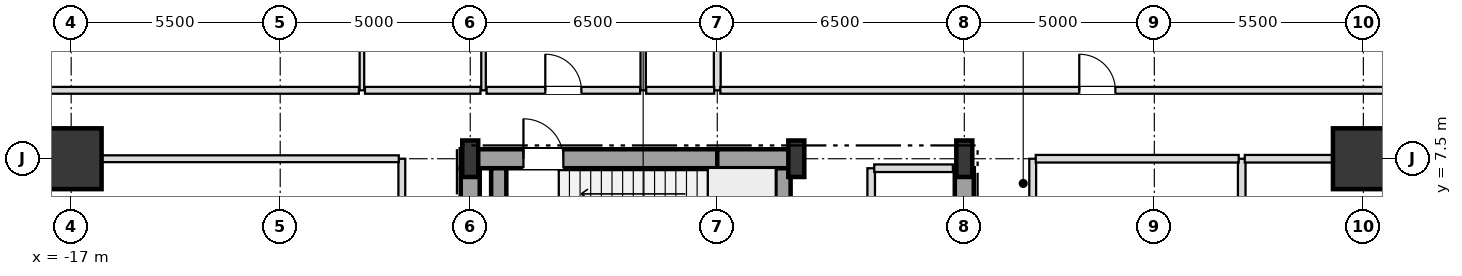
"""IFC4 building model, lengths in metres.
Left out: names, types, materials, properties, quantities, classifications, styles, units other than length and angle.
Written with IfcOpenShell. Run it as: python <this file> out.ifc"""

import sys

from ifc_helpers import new_model, si_unit, direction, frame, frame_2d, origin, origin_2d, place, context, subcontext, project, spatial, rectangle, i_section, extrude, element, fill, save


model = new_model("IFC4")
c1 = context("Model", 3, precision=1e-05, world=origin(), true_north=direction((0.0, 1.0)))
c2 = subcontext(c1, "Body", "Model", "MODEL_VIEW")
j1 = project(units=[si_unit("LENGTHUNIT", "METRE"), si_unit("PLANEANGLEUNIT", "RADIAN")], contexts=[c1])
p1 = place(None, origin())
s1 = spatial("IfcSite", under=j1, at=p1, CompositionType="ELEMENT")
p2 = place(p1, origin())
s2 = spatial("IfcBuilding", under=s1, at=p2, CompositionType="ELEMENT")
p3 = place(p2, frame((0.0, 0.0, 16.8)))
s3 = spatial("IfcBuildingStorey", under=s2, at=p3, CompositionType="ELEMENT", Elevation=16.8)
for number, where, z_axis, x_axis in (
    (1, (-6.5, 7.5, 0.0), (0.0, 0.0, 1.0), (1.0, 0.0, 0.0)),
    (2, (2.08, 7.5, 0.0), (0.0, 0.0, 1.0), (1.0, 0.0, 0.0)),
    (3, (6.5, 7.5, 0.0), (0.0, 0.0, 1.0), (1.0, 0.0, 0.0)),
):
    element("IfcColumn", number, at=place(p3, frame(where, z_axis=z_axis, x_axis=x_axis)), inside=s3, PredefinedType="COLUMN", context=c2, shape_type="SweptSolid", body=[
        extrude(i_section(OverallWidth=0.42, OverallDepth=0.96, WebThickness=0.022, FlangeThickness=0.034, at=origin_2d()), origin(), (0.0, 0.0, 1.0), 5.4),
    ])
for number, where, z_axis, x_axis in (
    (4, (17.0, 7.5, 0.0), (0.0, 0.0, 1.0), (1.0, 0.0, 0.0)),
    (5, (-17.0, 7.5, 0.0), (0.0, 0.0, 1.0), (1.0, 0.0, 0.0)),
):
    element("IfcColumn", number, at=place(p3, frame(where, z_axis=z_axis, x_axis=x_axis)), inside=s3, PredefinedType="USERDEFINED", context=c2, shape_type="SweptSolid", body=[
        extrude(rectangle(XDim=1.6, YDim=1.6, at=origin_2d()), origin(), (0.0, 0.0, 1.0), 5.4),
    ])
p4 = place(p3, frame((-6.75, 7.5, 0.0), z_axis=(0.0, 0.0, 1.0), x_axis=(1.0, 0.0, 0.0)))
e6 = element("IfcWall", 6, at=p4, inside=s3, PredefinedType="SHEAR", context=c2, shape_type="SweptSolid", body=[
    extrude(rectangle(XDim=6.75, YDim=0.5, at=frame_2d((3.375, 0.0))), origin(), (0.0, 0.0, 1.0), 5.12),
])
p5 = place(p4, frame((1.65, 0.0, 0.0)))
e7 = element("IfcOpeningElement", 7, at=p5, cuts=e6, PredefinedType="OPENING", context=c2, shape_type="SweptSolid", body=[
    extrude(rectangle(XDim=1.05, YDim=2.15, at=frame_2d((0.525, 1.075))), frame((0.0, 0.26, 0.0), z_axis=(0.0, -1.0, 0.0), x_axis=(1.0, 0.0, 0.0)), (0.0, 0.0, 1.0), 0.52),
])
p6 = place(p3, frame((0.0, 7.5, 0.0), z_axis=(0.0, 0.0, 1.0), x_axis=(1.0, 0.0, 0.0)))
e8 = element("IfcWall", 8, at=p6, inside=s3, PredefinedType="SHEAR", context=c2, shape_type="SweptSolid", body=[
    extrude(rectangle(XDim=2.08, YDim=0.5, at=frame_2d((1.04, 0.0))), origin(), (0.0, 0.0, 1.0), 5.12),
])
for number, where, z_axis, x_axis in (
    (9, (-6.5, 3.95, 0.0), (0.0, 0.0, 1.0), (0.0, 1.0, 0.0)),
    (10, (6.5, 3.95, 0.0), (0.0, 0.0, 1.0), (0.0, 1.0, 0.0)),
):
    element("IfcWall", number, at=place(p3, frame(where, z_axis=z_axis, x_axis=x_axis)), inside=s3, PredefinedType="SHEAR", context=c2, shape_type="SweptSolid", body=[
        extrude(rectangle(XDim=3.3, YDim=0.5, at=frame_2d((1.65, 0.0))), origin(), (0.0, 0.0, 1.0), 5.12),
    ])
for number, where, z_axis, x_axis in (
    (11, (1.73, 3.95, 0.0), (0.0, 0.0, 1.0), (0.0, 1.0, 0.0)),
    (12, (-5.75, 3.95, 0.0), (0.0, 0.0, 1.0), (0.0, 1.0, 0.0)),
):
    element("IfcWall", number, at=place(p3, frame(where, z_axis=z_axis, x_axis=x_axis)), inside=s3, PredefinedType="SHEAR", context=c2, shape_type="SweptSolid", body=[
        extrude(rectangle(XDim=3.3, YDim=0.4, at=frame_2d((1.65, 0.0))), origin(), (0.0, 0.0, 1.0), 5.12),
    ])
p7 = place(p3, frame((-9.35, 9.3, 0.0), z_axis=(0.0, 0.0, 1.0), x_axis=(0.0, 1.0, 0.0)))
e13 = element("IfcWall", 13, at=p7, inside=s3, PredefinedType="PARTITIONING", context=c2, shape_type="SweptSolid", body=[
    extrude(rectangle(XDim=3.9, YDim=0.12, at=frame_2d((1.95, 0.0))), origin(), (0.0, 0.0, 1.0), 4.41),
])
p8 = place(p7, frame((1.5, 0.0, 0.0)))
e14 = element("IfcOpeningElement", 14, at=p8, cuts=e13, PredefinedType="OPENING", context=c2, shape_type="SweptSolid", body=[
    extrude(rectangle(XDim=0.9, YDim=2.1, at=frame_2d((0.45, 1.05))), frame((0.0, 0.07, 0.0), z_axis=(0.0, -1.0, 0.0), x_axis=(1.0, 0.0, 0.0)), (0.0, 0.0, 1.0), 0.14),
])
p9 = place(p3, frame((-8.3, -7.5, 0.0), z_axis=(0.0, 0.0, 1.0), x_axis=(0.0, 1.0, 0.0)))
e15 = element("IfcWall", 15, at=p9, inside=s3, PredefinedType="PARTITIONING", context=c2, shape_type="SweptSolid", body=[
    extrude(rectangle(XDim=15.0, YDim=0.18, at=frame_2d((7.5, 0.0))), origin(), (0.0, 0.0, 1.0), 5.12),
])
p10 = place(p9, frame((7.025, 0.0, 0.0)))
e16 = element("IfcOpeningElement", 16, at=p10, cuts=e15, PredefinedType="OPENING", context=c2, shape_type="SweptSolid", body=[
    extrude(rectangle(XDim=0.95, YDim=2.15, at=frame_2d((0.475, 1.075))), frame((0.0, 0.1, 0.0), z_axis=(0.0, -1.0, 0.0), x_axis=(1.0, 0.0, 0.0)), (0.0, 0.0, 1.0), 0.2),
])
p11 = place(p3, frame((-6.15, 9.3, 0.0), z_axis=(0.0, 0.0, 1.0), x_axis=(0.0, 1.0, 0.0)))
e17 = element("IfcWall", 17, at=p11, inside=s3, PredefinedType="PARTITIONING", context=c2, shape_type="SweptSolid", body=[
    extrude(rectangle(XDim=3.9, YDim=0.12, at=frame_2d((1.95, 0.0))), origin(), (0.0, 0.0, 1.0), 5.12),
])
p12 = place(p11, frame((1.475, 0.0, 0.0)))
e18 = element("IfcOpeningElement", 18, at=p12, cuts=e17, PredefinedType="OPENING", context=c2, shape_type="SweptSolid", body=[
    extrude(rectangle(XDim=0.95, YDim=2.1, at=frame_2d((0.475, 1.05))), frame((0.0, 0.07, 0.0), z_axis=(0.0, -1.0, 0.0), x_axis=(1.0, 0.0, 0.0)), (0.0, 0.0, 1.0), 0.14),
])
p13 = place(p3, frame((-1.95, 9.3, 0.0), z_axis=(0.0, 0.0, 1.0), x_axis=(0.0, 1.0, 0.0)))
e19 = element("IfcWall", 19, at=p13, inside=s3, PredefinedType="PARTITIONING", context=c2, shape_type="SweptSolid", body=[
    extrude(rectangle(XDim=3.9, YDim=0.14, at=frame_2d((1.95, 0.0))), origin(), (0.0, 0.0, 1.0), 5.12),
])
p14 = place(p13, frame((1.5, 0.0, 0.0)))
e20 = element("IfcOpeningElement", 20, at=p14, cuts=e19, PredefinedType="OPENING", context=c2, shape_type="SweptSolid", body=[
    extrude(rectangle(XDim=0.9, YDim=2.1, at=frame_2d((0.45, 1.05))), frame((0.0, 0.08, 0.0), z_axis=(0.0, -1.0, 0.0), x_axis=(1.0, 0.0, 0.0)), (0.0, 0.0, 1.0), 0.16),
])
p15 = place(p3, frame((0.0, 9.3, 0.0), z_axis=(0.0, 0.0, 1.0), x_axis=(0.0, 1.0, 0.0)))
e21 = element("IfcWall", 21, at=p15, inside=s3, PredefinedType="PARTITIONING", context=c2, shape_type="SweptSolid", body=[
    extrude(rectangle(XDim=9.955, YDim=0.18, at=frame_2d((4.978, 0.0))), origin(), (0.0, 0.0, 1.0), 4.642),
])
p16 = place(p3, frame((4.05, 4.2, 0.0), z_axis=(0.0, 0.0, 1.0), x_axis=(0.0, 1.0, 0.0)))
e22 = element("IfcWall", 22, at=p16, inside=s3, PredefinedType="SOLIDWALL", context=c2, shape_type="SweptSolid", body=[
    extrude(rectangle(XDim=3.05, YDim=0.2, at=frame_2d((1.525, 0.0))), origin(), (0.0, 0.0, 1.0), 5.12),
])
p17 = place(p16, frame((0.975, 0.0, 0.0)))
e23 = element("IfcOpeningElement", 23, at=p17, cuts=e22, PredefinedType="OPENING", context=c2, shape_type="SweptSolid", body=[
    extrude(rectangle(XDim=0.95, YDim=2.15, at=frame_2d((0.475, 1.075))), frame((0.0, 0.11, 0.0), z_axis=(0.0, -1.0, 0.0), x_axis=(1.0, 0.0, 0.0)), (0.0, 0.0, 1.0), 0.22),
])
p18 = place(p3, frame((8.3, -7.5, 0.0), z_axis=(0.0, 0.0, 1.0), x_axis=(0.0, 1.0, 0.0)))
e24 = element("IfcWall", 24, at=p18, inside=s3, PredefinedType="PARTITIONING", context=c2, shape_type="SweptSolid", body=[
    extrude(rectangle(XDim=15.0, YDim=0.18, at=frame_2d((7.5, 0.0))), origin(), (0.0, 0.0, 1.0), 5.12),
])
p19 = place(p18, frame((5.025, 0.0, 0.0)))
e25 = element("IfcOpeningElement", 25, at=p19, cuts=e24, PredefinedType="OPENING", context=c2, shape_type="SweptSolid", body=[
    extrude(rectangle(XDim=0.95, YDim=2.15, at=frame_2d((0.475, 1.075))), frame((0.0, 0.1, 0.0), z_axis=(0.0, -1.0, 0.0), x_axis=(1.0, 0.0, 0.0)), (0.0, 0.0, 1.0), 0.2),
])
p20 = place(p18, frame((12.225, 0.0, 0.0)))
e26 = element("IfcOpeningElement", 26, at=p20, cuts=e24, PredefinedType="OPENING", context=c2, shape_type="SweptSolid", body=[
    extrude(rectangle(XDim=0.95, YDim=2.15, at=frame_2d((0.475, 1.075))), frame((0.0, 0.1, 0.0), z_axis=(0.0, -1.0, 0.0), x_axis=(1.0, 0.0, 0.0)), (0.0, 0.0, 1.0), 0.2),
])
p21 = place(p3, frame((13.8, 3.2, 0.0), z_axis=(0.0, 0.0, 1.0), x_axis=(0.0, 1.0, 0.0)))
e27 = element("IfcWall", 27, at=p21, inside=s3, PredefinedType="SOLIDWALL", context=c2, shape_type="SweptSolid", body=[
    extrude(rectangle(XDim=4.3, YDim=0.2, at=frame_2d((2.15, 0.0))), origin(), (0.0, 0.0, 1.0), 5.12),
])
p22 = place(p3, frame((4.13, 7.25, 0.0), z_axis=(0.0, 0.0, 1.0), x_axis=(1.0, 0.0, 0.0)))
e28 = element("IfcWall", 28, at=p22, inside=s3, PredefinedType="SOLIDWALL", context=c2, shape_type="SweptSolid", body=[
    extrude(rectangle(XDim=2.07, YDim=0.2, at=frame_2d((1.035, 0.0))), origin(), (0.0, 0.0, 1.0), 4.41),
])
p23 = place(p3, frame((-22.695, 7.5, 0.0), z_axis=(0.0, 0.0, 1.0), x_axis=(1.0, 0.0, 0.0)))
e29 = element("IfcWall", 29, at=p23, inside=s3, PredefinedType="PARTITIONING", context=c2, shape_type="SweptSolid", body=[
    extrude(rectangle(XDim=14.315, YDim=0.18, at=frame_2d((7.158, 0.0))), origin(), (0.0, 0.0, 1.0), 4.41),
])
p24 = place(p3, frame((8.38, 7.5, 0.0), z_axis=(0.0, 0.0, 1.0), x_axis=(1.0, 0.0, 0.0)))
e30 = element("IfcWall", 30, at=p24, inside=s3, PredefinedType="SOLIDWALL", context=c2, shape_type="SweptSolid", body=[
    extrude(rectangle(XDim=5.34, YDim=0.2, at=frame_2d((2.67, 0.0))), origin(), (0.0, 0.0, 1.0), 4.41),
])
p25 = place(p3, frame((13.88, 7.5, 0.0), z_axis=(0.0, 0.0, 1.0), x_axis=(1.0, 0.0, 0.0)))
e31 = element("IfcWall", 31, at=p25, inside=s3, PredefinedType="SOLIDWALL", context=c2, shape_type="SweptSolid", body=[
    extrude(rectangle(XDim=8.815, YDim=0.2, at=frame_2d((4.408, 0.0))), origin(), (0.0, 0.0, 1.0), 4.41),
])
p26 = place(p3, frame((-22.695, 9.3, 0.0), z_axis=(0.0, 0.0, 1.0), x_axis=(1.0, 0.0, 0.0)))
e32 = element("IfcWall", 32, at=p26, inside=s3, PredefinedType="PARTITIONING", context=c2, shape_type="SweptSolid", body=[
    extrude(rectangle(XDim=13.265, YDim=0.18, at=frame_2d((6.633, 0.0))), origin(), (0.0, 0.0, 1.0), 4.41),
])
p27 = place(p3, frame((-9.27, 9.3, 0.0), z_axis=(0.0, 0.0, 1.0), x_axis=(1.0, 0.0, 0.0)))
e33 = element("IfcWall", 33, at=p27, inside=s3, PredefinedType="PARTITIONING", context=c2, shape_type="SweptSolid", body=[
    extrude(rectangle(XDim=3.04, YDim=0.18, at=frame_2d((1.52, 0.0))), origin(), (0.0, 0.0, 1.0), 4.41),
])
p28 = place(p3, frame((-6.07, 9.3, 0.0), z_axis=(0.0, 0.0, 1.0), x_axis=(1.0, 0.0, 0.0)))
e34 = element("IfcWall", 34, at=p28, inside=s3, PredefinedType="PARTITIONING", context=c2, shape_type="SweptSolid", body=[
    extrude(rectangle(XDim=4.04, YDim=0.18, at=frame_2d((2.02, 0.0))), origin(), (0.0, 0.0, 1.0), 5.12),
])
p29 = place(p28, frame((1.545, 0.0, 0.0)))
e35 = element("IfcOpeningElement", 35, at=p29, cuts=e34, PredefinedType="OPENING", context=c2, shape_type="SweptSolid", body=[
    extrude(rectangle(XDim=0.95, YDim=2.15, at=frame_2d((0.475, 1.075))), frame((0.0, 0.1, 0.0), z_axis=(0.0, -1.0, 0.0), x_axis=(1.0, 0.0, 0.0)), (0.0, 0.0, 1.0), 0.2),
])
p30 = place(p3, frame((-1.87, 9.3, 0.0), z_axis=(0.0, 0.0, 1.0), x_axis=(1.0, 0.0, 0.0)))
e36 = element("IfcWall", 36, at=p30, inside=s3, PredefinedType="PARTITIONING", context=c2, shape_type="SweptSolid", body=[
    extrude(rectangle(XDim=1.79, YDim=0.18, at=frame_2d((0.895, 0.0))), origin(), (0.0, 0.0, 1.0), 5.12),
])
p31 = place(p3, frame((0.08, 9.3, 0.0), z_axis=(0.0, 0.0, 1.0), x_axis=(1.0, 0.0, 0.0)))
e37 = element("IfcWall", 37, at=p31, inside=s3, PredefinedType="PARTITIONING", context=c2, shape_type="SweptSolid", body=[
    extrude(rectangle(XDim=22.615, YDim=0.18, at=frame_2d((11.308, 0.0))), origin(), (0.0, 0.0, 1.0), 4.41),
])
p32 = place(p31, frame((9.445, 0.0, 0.0)))
e38 = element("IfcOpeningElement", 38, at=p32, cuts=e37, PredefinedType="OPENING", context=c2, shape_type="SweptSolid", body=[
    extrude(rectangle(XDim=0.95, YDim=2.15, at=frame_2d((0.475, 1.075))), frame((0.0, 0.1, 0.0), z_axis=(0.0, -1.0, 0.0), x_axis=(1.0, 0.0, 0.0)), (0.0, 0.0, 1.0), 0.2),
])
p33 = place(p5, origin())
e39 = element("IfcDoor", 39, at=p33, inside=s3, OperationType="SINGLE_SWING_LEFT", PredefinedType="DOOR", context=c2, shape_type="SweptSolid", body=[
    extrude(rectangle(XDim=1.05, YDim=2.15, at=frame_2d((0.525, 1.075))), frame((0.0, 0.025, 0.0), z_axis=(0.0, -1.0, 0.0), x_axis=(1.0, 0.0, 0.0)), (0.0, 0.0, 1.0), 0.05),
])
fill(e7, e39)
p34 = place(p29, origin())
e40 = element("IfcDoor", 40, at=p34, inside=s3, OperationType="SINGLE_SWING_LEFT", PredefinedType="DOOR", context=c2, shape_type="SweptSolid", body=[
    extrude(rectangle(XDim=0.95, YDim=2.15, at=frame_2d((0.475, 1.075))), frame((0.0, 0.025, 0.0), z_axis=(0.0, -1.0, 0.0), x_axis=(1.0, 0.0, 0.0)), (0.0, 0.0, 1.0), 0.05),
])
fill(e35, e40)
p35 = place(p32, origin())
e41 = element("IfcDoor", 41, at=p35, inside=s3, OperationType="SINGLE_SWING_LEFT", PredefinedType="DOOR", context=c2, shape_type="SweptSolid", body=[
    extrude(rectangle(XDim=0.95, YDim=2.15, at=frame_2d((0.475, 1.075))), frame((0.0, 0.025, 0.0), z_axis=(0.0, -1.0, 0.0), x_axis=(1.0, 0.0, 0.0)), (0.0, 0.0, 1.0), 0.05),
])
fill(e38, e41)
save(model, sys.argv[1])
